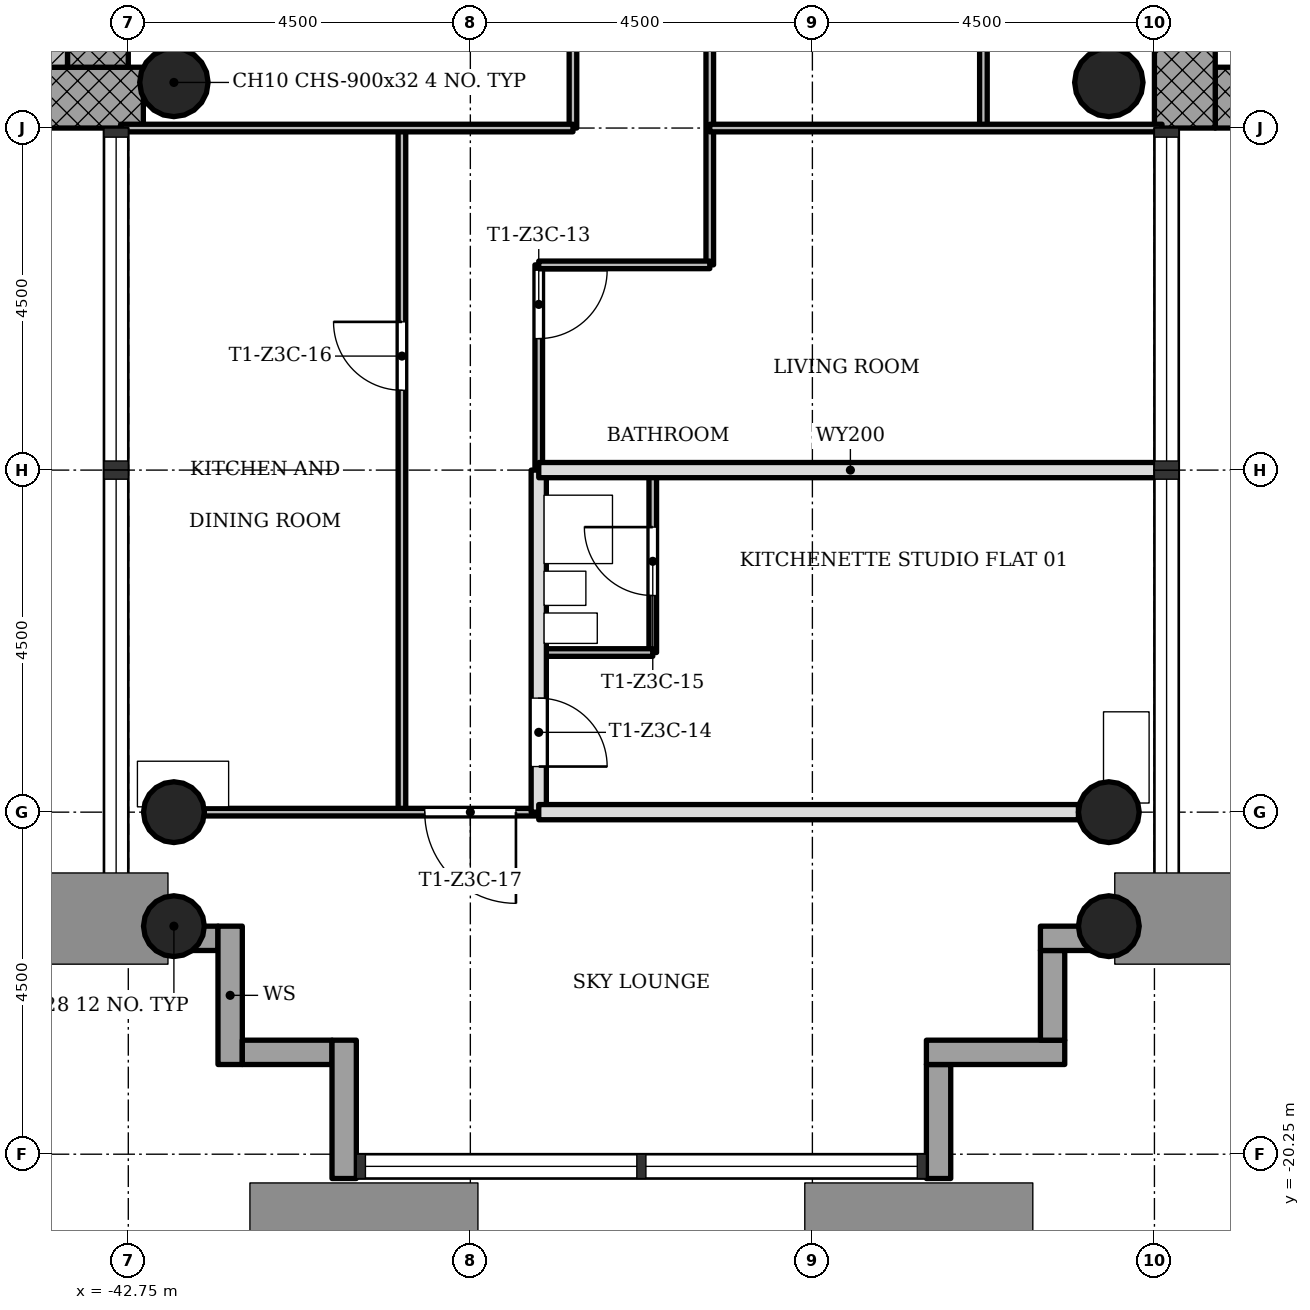
"""IFC4 building model, lengths in metres.
Left out: names, types, materials, properties, quantities, classifications, styles, units other than length and angle.
Written with IfcOpenShell. Run it as: python <this file> out.ifc"""

import sys

from ifc_helpers import new_model, si_unit, direction, frame, frame_2d, origin, origin_2d, place, context, subcontext, project, spatial, rectangle, hollow_circle, extrude, element, fill, save


model = new_model("IFC4")
c1 = context("Model", 3, precision=1e-05, world=origin(), true_north=direction((0.0, 1.0)))
c2 = subcontext(c1, "Body", "Model", "MODEL_VIEW")
j1 = project(units=[si_unit("LENGTHUNIT", "METRE"), si_unit("PLANEANGLEUNIT", "RADIAN")], contexts=[c1])
p1 = place(None, origin())
s1 = spatial("IfcSite", under=j1, at=p1, CompositionType="ELEMENT")
p2 = place(p1, origin())
s2 = spatial("IfcBuilding", under=s1, at=p2, CompositionType="ELEMENT")
p3 = place(p2, frame((0.0, 0.0, 157.5)))
s3 = spatial("IfcBuildingStorey", under=s2, at=p3, CompositionType="ELEMENT", Elevation=157.5)
p4 = place(p3, frame((-28.45, -6.35, 0.0), z_axis=(0.0, 0.0, 1.0), x_axis=(1.0, 0.0, 0.0)))
e1 = element("IfcWall", 1, at=p4, inside=s3, PredefinedType="SHEAR", context=c2, shape_type="SweptSolid", body=[
    extrude(rectangle(XDim=8.2, YDim=0.8, at=frame_2d((4.1, 0.0))), origin(), (0.0, 0.0, 1.0), 3.4),
])
p5 = place(p3, frame((-28.85, 5.95, 0.0), z_axis=(0.0, 0.0, 1.0), x_axis=(0.0, -1.0, 0.0)))
e2 = element("IfcWall", 2, at=p5, inside=s3, PredefinedType="SHEAR", context=c2, shape_type="SweptSolid", body=[
    extrude(rectangle(XDim=12.7, YDim=0.8, at=frame_2d((6.35, 0.0))), origin(), (0.0, 0.0, 1.0), 3.4),
])
p6 = place(p5, frame((5.05, 0.0, 0.0)))
e3 = element("IfcOpeningElement", 3, at=p6, cuts=e2, PredefinedType="OPENING", context=c2, shape_type="SweptSolid", body=[
    extrude(rectangle(XDim=1.8, YDim=2.1, at=frame_2d((0.9, 1.05))), frame((0.0, 0.41, 0.0), z_axis=(0.0, -1.0, 0.0), x_axis=(1.0, 0.0, 0.0)), (0.0, 0.0, 1.0), 0.82),
])
p7 = place(p3, frame((-50.95, -6.35, 0.0), z_axis=(0.0, 0.0, 1.0), x_axis=(1.0, 0.0, 0.0)))
e4 = element("IfcWall", 4, at=p7, inside=s3, PredefinedType="SHEAR", context=c2, shape_type="SweptSolid", body=[
    extrude(rectangle(XDim=8.398, YDim=0.8, at=frame_2d((4.199, 0.0))), origin(), (0.0, 0.0, 1.0), 3.4),
])
p8 = place(p3, frame((-43.15, -5.95, 0.0), z_axis=(0.0, 0.0, 1.0), x_axis=(0.0, 1.0, 0.0)))
e5 = element("IfcWall", 5, at=p8, inside=s3, PredefinedType="SHEAR", context=c2, shape_type="SweptSolid", body=[
    extrude(rectangle(XDim=12.7, YDim=0.8, at=frame_2d((6.35, 0.0))), origin(), (0.0, 0.0, 1.0), 3.4),
])
p9 = place(p8, frame((5.05, 0.0, 0.0)))
e6 = element("IfcOpeningElement", 6, at=p9, cuts=e5, PredefinedType="OPENING", context=c2, shape_type="SweptSolid", body=[
    extrude(rectangle(XDim=1.8, YDim=2.1, at=frame_2d((0.9, 1.05))), frame((0.0, 0.41, 0.0), z_axis=(0.0, -1.0, 0.0), x_axis=(1.0, 0.0, 0.0)), (0.0, 0.0, 1.0), 0.82),
])
for number, where, z_axis, x_axis in (
    (7, (-42.15, -15.75, 0.0), (0.0, 0.0, 1.0), (1.0, 0.0, 0.0)),
    (8, (-29.85, -15.75, 0.0), (0.0, 0.0, 1.0), (1.0, 0.0, 0.0)),
    (9, (-42.15, -17.25, 0.0), (0.0, 0.0, 1.0), (1.0, 0.0, 0.0)),
    (10, (-29.85, -17.25, 0.0), (0.0, 0.0, 1.0), (1.0, 0.0, 0.0)),
):
    element("IfcColumn", number, at=place(p3, frame(where, z_axis=z_axis, x_axis=x_axis)), inside=s3, PredefinedType="COLUMN", context=c2, shape_type="SweptSolid", body=[
        extrude(hollow_circle(Radius=0.4, WallThickness=0.028, at=origin_2d()), origin(), (0.0, 0.0, 1.0), 3.4),
    ])
for number, where, z_axis, x_axis in (
    (11, (-42.15, -6.15, 0.0), (0.0, 0.0, 1.0), (1.0, 0.0, 0.0)),
    (12, (-29.85, -6.15, 0.0), (0.0, 0.0, 1.0), (1.0, 0.0, 0.0)),
):
    element("IfcColumn", number, at=place(p3, frame(where, z_axis=z_axis, x_axis=x_axis)), inside=s3, PredefinedType="COLUMN", context=c2, shape_type="SweptSolid", body=[
        extrude(hollow_circle(Radius=0.45, WallThickness=0.032, at=origin_2d()), origin(), (0.0, 0.0, 1.0), 3.4),
    ])
p10 = place(p3, frame((-43.07, -17.41, -0.3), z_axis=(0.0, 0.0, 1.0), x_axis=(1.0, 0.0, 0.0)))
e13 = element("IfcWall", 13, at=p10, inside=s3, PredefinedType="STANDARD", context=c2, shape_type="SweptSolid", body=[
    extrude(rectangle(XDim=1.5, YDim=0.32, at=frame_2d((0.75, 0.0))), origin(), (0.0, 0.0, 1.0), 3.4),
])
p11 = place(p3, frame((-41.41, -17.25, -0.3), z_axis=(0.0, 0.0, 1.0), x_axis=(0.0, -1.0, 0.0)))
e14 = element("IfcWall", 14, at=p11, inside=s3, PredefinedType="STANDARD", context=c2, shape_type="SweptSolid", body=[
    extrude(rectangle(XDim=1.82, YDim=0.32, at=frame_2d((0.91, 0.0))), origin(), (0.0, 0.0, 1.0), 3.4),
])
p12 = place(p3, frame((-41.25, -18.91, -0.3), z_axis=(0.0, 0.0, 1.0), x_axis=(1.0, 0.0, 0.0)))
e15 = element("IfcWall", 15, at=p12, inside=s3, PredefinedType="STANDARD", context=c2, shape_type="SweptSolid", body=[
    extrude(rectangle(XDim=1.18, YDim=0.32, at=frame_2d((0.59, 0.0))), origin(), (0.0, 0.0, 1.0), 3.4),
])
p13 = place(p3, frame((-39.91, -18.75, -0.3), z_axis=(0.0, 0.0, 1.0), x_axis=(0.0, -1.0, 0.0)))
e16 = element("IfcWall", 16, at=p13, inside=s3, PredefinedType="STANDARD", context=c2, shape_type="SweptSolid", body=[
    extrude(rectangle(XDim=1.82, YDim=0.32, at=frame_2d((0.91, 0.0))), origin(), (0.0, 0.0, 1.0), 3.4),
])
p14 = place(p3, frame((-32.09, -20.57, -0.3), z_axis=(0.0, 0.0, 1.0), x_axis=(0.0, 1.0, 0.0)))
e17 = element("IfcWall", 17, at=p14, inside=s3, PredefinedType="STANDARD", context=c2, shape_type="SweptSolid", body=[
    extrude(rectangle(XDim=1.5, YDim=0.32, at=frame_2d((0.75, 0.0))), origin(), (0.0, 0.0, 1.0), 3.4),
])
p15 = place(p3, frame((-32.25, -18.91, -0.3), z_axis=(0.0, 0.0, 1.0), x_axis=(1.0, 0.0, 0.0)))
e18 = element("IfcWall", 18, at=p15, inside=s3, PredefinedType="STANDARD", context=c2, shape_type="SweptSolid", body=[
    extrude(rectangle(XDim=1.82, YDim=0.32, at=frame_2d((0.91, 0.0))), origin(), (0.0, 0.0, 1.0), 3.4),
])
p16 = place(p3, frame((-30.59, -18.75, -0.3), z_axis=(0.0, 0.0, 1.0), x_axis=(0.0, 1.0, 0.0)))
e19 = element("IfcWall", 19, at=p16, inside=s3, PredefinedType="STANDARD", context=c2, shape_type="SweptSolid", body=[
    extrude(rectangle(XDim=1.18, YDim=0.32, at=frame_2d((0.59, 0.0))), origin(), (0.0, 0.0, 1.0), 3.4),
])
p17 = place(p3, frame((-30.75, -17.41, -0.3), z_axis=(0.0, 0.0, 1.0), x_axis=(1.0, 0.0, 0.0)))
e20 = element("IfcWall", 20, at=p17, inside=s3, PredefinedType="STANDARD", context=c2, shape_type="SweptSolid", body=[
    extrude(rectangle(XDim=1.82, YDim=0.32, at=frame_2d((0.91, 0.0))), origin(), (0.0, 0.0, 1.0), 3.4),
])
p18 = place(p3, frame((-39.15, -15.75, 0.0), z_axis=(0.0, 0.0, 1.0), x_axis=(0.0, 1.0, 0.0)))
e21 = element("IfcWall", 21, at=p18, inside=s3, PredefinedType="PARTITIONING", context=c2, shape_type="SweptSolid", body=[
    extrude(rectangle(XDim=9.0, YDim=0.1, at=frame_2d((4.5, 0.0))), origin(), (0.0, 0.0, 1.0), 3.0),
])
p19 = place(p18, frame((5.55, 0.0, 0.0)))
e22 = element("IfcOpeningElement", 22, at=p19, cuts=e21, PredefinedType="OPENING", context=c2, shape_type="SweptSolid", body=[
    extrude(rectangle(XDim=0.9, YDim=2.1, at=frame_2d((0.45, 1.05))), frame((0.0, 0.06, 0.0), z_axis=(0.0, -1.0, 0.0), x_axis=(1.0, 0.0, 0.0)), (0.0, 0.0, 1.0), 0.12),
])
p20 = place(p3, frame((-37.35, -11.25, 0.0), z_axis=(0.0, 0.0, 1.0), x_axis=(0.0, 1.0, 0.0)))
e23 = element("IfcWall", 23, at=p20, inside=s3, PredefinedType="PARTITIONING", context=c2, shape_type="SweptSolid", body=[
    extrude(rectangle(XDim=2.7, YDim=0.1, at=frame_2d((1.35, 0.0))), origin(), (0.0, 0.0, 1.0), 3.0),
])
p21 = place(p20, frame((1.73, 0.0, 0.0)))
e24 = element("IfcOpeningElement", 24, at=p21, cuts=e23, PredefinedType="OPENING", context=c2, shape_type="SweptSolid", body=[
    extrude(rectangle(XDim=0.9, YDim=2.1, at=frame_2d((0.45, 1.05))), frame((0.0, 0.06, 0.0), z_axis=(0.0, -1.0, 0.0), x_axis=(1.0, 0.0, 0.0)), (0.0, 0.0, 1.0), 0.12),
])
p22 = place(p3, frame((-37.35, -15.75, 0.0), z_axis=(0.0, 0.0, 1.0), x_axis=(0.0, 1.0, 0.0)))
e25 = element("IfcWall", 25, at=p22, inside=s3, PredefinedType="SOLIDWALL", context=c2, shape_type="SweptSolid", body=[
    extrude(rectangle(XDim=4.5, YDim=0.2, at=frame_2d((2.25, 0.0))), origin(), (0.0, 0.0, 1.0), 3.0),
])
p23 = place(p22, frame((0.6, 0.0, 0.0)))
e26 = element("IfcOpeningElement", 26, at=p23, cuts=e25, PredefinedType="OPENING", context=c2, shape_type="SweptSolid", body=[
    extrude(rectangle(XDim=0.9, YDim=2.1, at=frame_2d((0.45, 1.05))), frame((0.0, 0.11, 0.0), z_axis=(0.0, -1.0, 0.0), x_axis=(1.0, 0.0, 0.0)), (0.0, 0.0, 1.0), 0.22),
])
p24 = place(p3, frame((-36.9, -6.75, 0.0), z_axis=(0.0, 0.0, 1.0), x_axis=(0.0, 1.0, 0.0)))
e27 = element("IfcWall", 27, at=p24, inside=s3, PredefinedType="PARTITIONING", context=c2, shape_type="SweptSolid", body=[
    extrude(rectangle(XDim=2.25, YDim=0.1, at=frame_2d((1.125, 0.0))), origin(), (0.0, 0.0, 1.0), 3.0),
])
p25 = place(p3, frame((-35.85, -13.65, 0.0), z_axis=(0.0, 0.0, 1.0), x_axis=(0.0, 1.0, 0.0)))
e28 = element("IfcWall", 28, at=p25, inside=s3, PredefinedType="PARTITIONING", context=c2, shape_type="SweptSolid", body=[
    extrude(rectangle(XDim=2.4, YDim=0.1, at=frame_2d((1.2, 0.0))), origin(), (0.0, 0.0, 1.0), 3.0),
])
p26 = place(p25, frame((0.75, 0.0, 0.0)))
e29 = element("IfcOpeningElement", 29, at=p26, cuts=e28, PredefinedType="OPENING", context=c2, shape_type="SweptSolid", body=[
    extrude(rectangle(XDim=0.9, YDim=2.1, at=frame_2d((0.45, 1.05))), frame((0.0, 0.06, 0.0), z_axis=(0.0, -1.0, 0.0), x_axis=(1.0, 0.0, 0.0)), (0.0, 0.0, 1.0), 0.12),
])
p27 = place(p3, frame((-35.1, -8.55, 0.0), z_axis=(0.0, 0.0, 1.0), x_axis=(0.0, 1.0, 0.0)))
e30 = element("IfcWall", 30, at=p27, inside=s3, PredefinedType="PARTITIONING", context=c2, shape_type="SweptSolid", body=[
    extrude(rectangle(XDim=4.05, YDim=0.1, at=frame_2d((2.025, 0.0))), origin(), (0.0, 0.0, 1.0), 3.0),
])
p28 = place(p3, frame((-31.5, -6.75, 0.0), z_axis=(0.0, 0.0, 1.0), x_axis=(0.0, 1.0, 0.0)))
e31 = element("IfcWall", 31, at=p28, inside=s3, PredefinedType="PARTITIONING", context=c2, shape_type="SweptSolid", body=[
    extrude(rectangle(XDim=5.25, YDim=0.1, at=frame_2d((2.625, 0.0))), origin(), (0.0, 0.0, 1.0), 3.0),
])
p29 = place(p28, frame((3.3, 0.0, 0.0)))
e32 = element("IfcOpeningElement", 32, at=p29, cuts=e31, PredefinedType="OPENING", context=c2, shape_type="SweptSolid", body=[
    extrude(rectangle(XDim=0.9, YDim=2.1, at=frame_2d((0.45, 1.05))), frame((0.0, 0.06, 0.0), z_axis=(0.0, -1.0, 0.0), x_axis=(1.0, 0.0, 0.0)), (0.0, 0.0, 1.0), 0.12),
])
p30 = place(p3, frame((-41.75, -15.75, 0.0), z_axis=(0.0, 0.0, 1.0), x_axis=(1.0, 0.0, 0.0)))
e33 = element("IfcWall", 33, at=p30, inside=s3, PredefinedType="PARTITIONING", context=c2, shape_type="SweptSolid", body=[
    extrude(rectangle(XDim=4.4, YDim=0.1, at=frame_2d((2.2, 0.0))), origin(), (0.0, 0.0, 1.0), 3.0),
])
p31 = place(p30, frame((2.9, 0.0, 0.0)))
e34 = element("IfcOpeningElement", 34, at=p31, cuts=e33, PredefinedType="OPENING", context=c2, shape_type="SweptSolid", body=[
    extrude(rectangle(XDim=1.2, YDim=2.1, at=frame_2d((0.6, 1.05))), frame((0.0, 0.06, 0.0), z_axis=(0.0, -1.0, 0.0), x_axis=(1.0, 0.0, 0.0)), (0.0, 0.0, 1.0), 0.12),
])
p32 = place(p3, frame((-37.35, -15.75, 0.0), z_axis=(0.0, 0.0, 1.0), x_axis=(1.0, 0.0, 0.0)))
e35 = element("IfcWall", 35, at=p32, inside=s3, PredefinedType="SOLIDWALL", context=c2, shape_type="SweptSolid", body=[
    extrude(rectangle(XDim=7.1, YDim=0.2, at=frame_2d((3.55, 0.0))), origin(), (0.0, 0.0, 1.0), 3.0),
])
p33 = place(p3, frame((-37.35, -13.65, 0.0), z_axis=(0.0, 0.0, 1.0), x_axis=(1.0, 0.0, 0.0)))
e36 = element("IfcWall", 36, at=p33, inside=s3, PredefinedType="PARTITIONING", context=c2, shape_type="SweptSolid", body=[
    extrude(rectangle(XDim=1.5, YDim=0.1, at=frame_2d((0.75, 0.0))), origin(), (0.0, 0.0, 1.0), 3.0),
])
p34 = place(p3, frame((-37.35, -11.25, 0.0), z_axis=(0.0, 0.0, 1.0), x_axis=(1.0, 0.0, 0.0)))
e37 = element("IfcWall", 37, at=p34, inside=s3, PredefinedType="SOLIDWALL", context=c2, shape_type="SweptSolid", body=[
    extrude(rectangle(XDim=8.2, YDim=0.2, at=frame_2d((4.1, 0.0))), origin(), (0.0, 0.0, 1.0), 3.0),
])
p35 = place(p3, frame((-37.35, -8.55, 0.0), z_axis=(0.0, 0.0, 1.0), x_axis=(1.0, 0.0, 0.0)))
e38 = element("IfcWall", 38, at=p35, inside=s3, PredefinedType="PARTITIONING", context=c2, shape_type="SweptSolid", body=[
    extrude(rectangle(XDim=2.25, YDim=0.1, at=frame_2d((1.125, 0.0))), origin(), (0.0, 0.0, 1.0), 3.0),
])
for number, where, z_axis, x_axis in (
    (39, (-42.85, -6.75, 0.0), (0.0, 0.0, 1.0), (1.0, 0.0, 0.0)),
    (40, (-35.1, -6.75, 0.0), (0.0, 0.0, 1.0), (1.0, 0.0, 0.0)),
):
    element("IfcWall", number, at=place(p3, frame(where, z_axis=z_axis, x_axis=x_axis)), inside=s3, PredefinedType="PARTITIONING", context=c2, shape_type="SweptSolid", body=[
        extrude(rectangle(XDim=5.95, YDim=0.1, at=frame_2d((2.975, 0.0))), origin(), (0.0, 0.0, 1.0), 3.0),
    ])
p36 = place(p3, frame((-43.75, -1.85, 0.0), z_axis=(0.0, 0.0, 1.0), x_axis=(0.0, -1.0, 0.0)))
e41 = element("IfcWall", 41, at=p36, inside=s3, PredefinedType="SHEAR", context=c2, shape_type="SweptSolid", body=[
    extrude(rectangle(XDim=4.1, YDim=0.4, at=frame_2d((2.05, 0.0))), origin(), (0.0, 0.0, 1.0), 3.4),
])
p37 = place(p21, origin())
e42 = element("IfcDoor", 42, at=p37, inside=s3, OperationType="SINGLE_SWING_RIGHT", PredefinedType="DOOR", context=c2, shape_type="SweptSolid", body=[
    extrude(rectangle(XDim=0.9, YDim=2.1, at=frame_2d((0.45, 1.05))), frame((0.0, 0.025, 0.0), z_axis=(0.0, -1.0, 0.0), x_axis=(1.0, 0.0, 0.0)), (0.0, 0.0, 1.0), 0.05),
])
fill(e24, e42)
p38 = place(p23, origin())
e43 = element("IfcDoor", 43, at=p38, inside=s3, OperationType="SINGLE_SWING_LEFT", PredefinedType="DOOR", context=c2, shape_type="SweptSolid", body=[
    extrude(rectangle(XDim=0.9, YDim=2.1, at=frame_2d((0.45, 1.05))), frame((0.0, 0.025, 0.0), z_axis=(0.0, -1.0, 0.0), x_axis=(1.0, 0.0, 0.0)), (0.0, 0.0, 1.0), 0.05),
])
fill(e26, e43)
p39 = place(p26, origin())
e44 = element("IfcDoor", 44, at=p39, inside=s3, OperationType="SINGLE_SWING_LEFT", PredefinedType="DOOR", context=c2, shape_type="SweptSolid", body=[
    extrude(rectangle(XDim=0.9, YDim=2.1, at=frame_2d((0.45, 1.05))), frame((0.0, 0.025, 0.0), z_axis=(0.0, -1.0, 0.0), x_axis=(1.0, 0.0, 0.0)), (0.0, 0.0, 1.0), 0.05),
])
fill(e29, e44)
p40 = place(p19, origin())
e45 = element("IfcDoor", 45, at=p40, inside=s3, OperationType="SINGLE_SWING_LEFT", PredefinedType="DOOR", context=c2, shape_type="SweptSolid", body=[
    extrude(rectangle(XDim=0.9, YDim=2.1, at=frame_2d((0.45, 1.05))), frame((0.0, 0.025, 0.0), z_axis=(0.0, -1.0, 0.0), x_axis=(1.0, 0.0, 0.0)), (0.0, 0.0, 1.0), 0.05),
])
fill(e22, e45)
p41 = place(p31, origin())
e46 = element("IfcDoor", 46, at=p41, inside=s3, OperationType="SINGLE_SWING_RIGHT", PredefinedType="DOOR", context=c2, shape_type="SweptSolid", body=[
    extrude(rectangle(XDim=1.2, YDim=2.1, at=frame_2d((0.6, 1.05))), frame((0.0, 0.025, 0.0), z_axis=(0.0, -1.0, 0.0), x_axis=(1.0, 0.0, 0.0)), (0.0, 0.0, 1.0), 0.05),
])
fill(e34, e46)
save(model, sys.argv[1])
